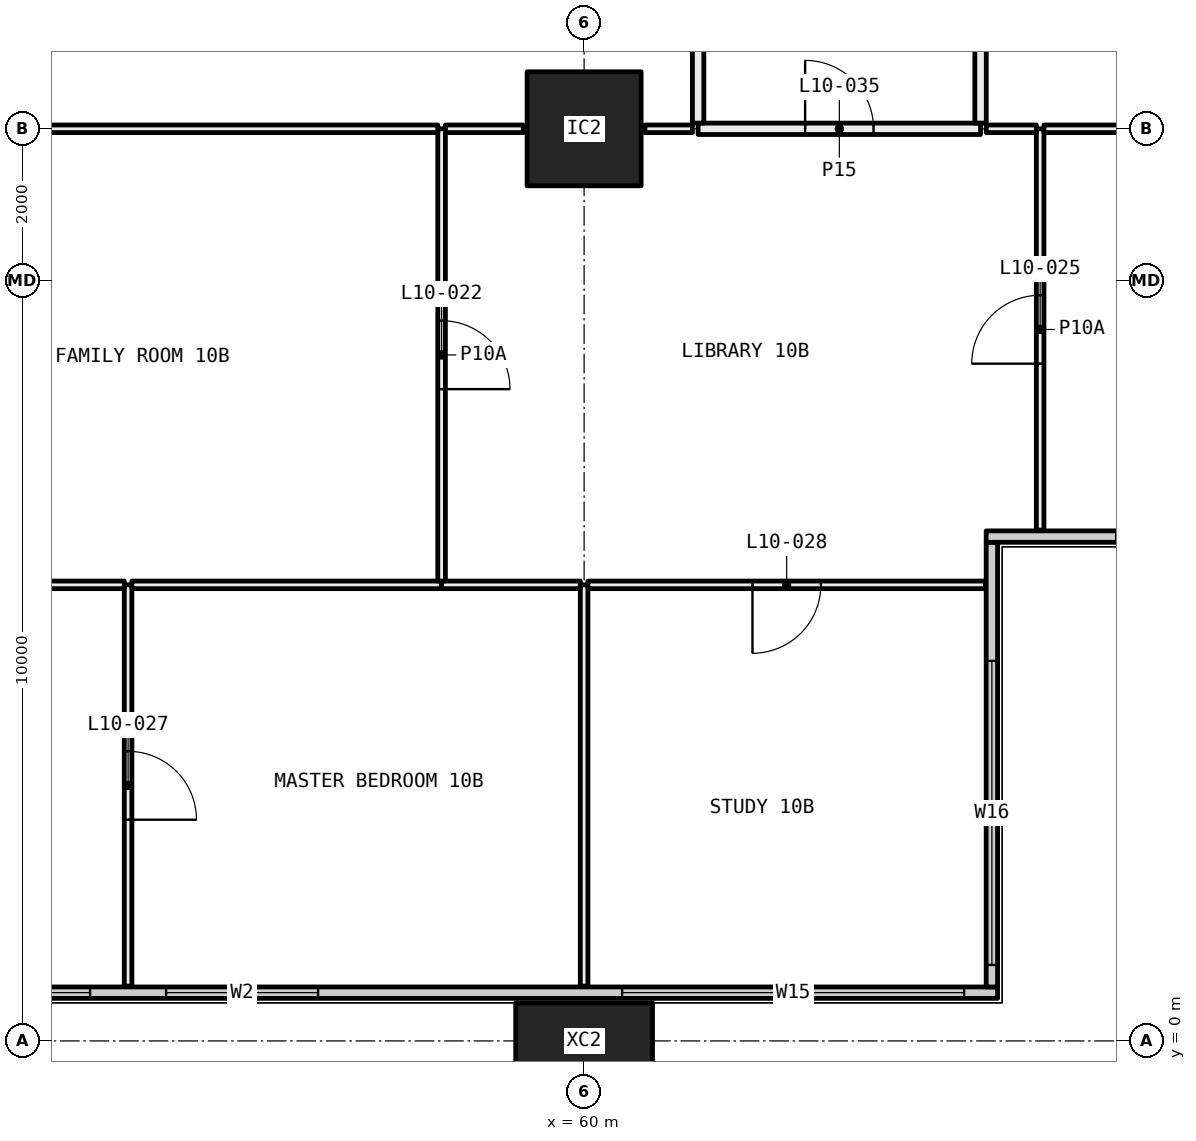
"""IFC4 building model, lengths in metres.
Left out: names, types, materials, properties, quantities, classifications, styles, units other than length and angle.
Written with IfcOpenShell. Run it as: python <this file> out.ifc"""

import sys

from ifc_helpers import new_model, si_unit, direction, frame, frame_2d, origin, origin_2d, place, context, subcontext, project, spatial, rectangle, hollow_rectangle, extrude, element, fill, save


model = new_model("IFC4")
c1 = context("Model", 3, precision=1e-05, world=origin(), true_north=direction((0.0, 1.0)))
c2 = subcontext(c1, "Body", "Model", "MODEL_VIEW")
j1 = project(units=[si_unit("LENGTHUNIT", "METRE"), si_unit("PLANEANGLEUNIT", "RADIAN")], contexts=[c1])
p1 = place(None, origin())
s1 = spatial("IfcSite", under=j1, at=p1, CompositionType="ELEMENT")
p2 = place(p1, origin())
s2 = spatial("IfcBuilding", under=s1, at=p2, CompositionType="ELEMENT")
p3 = place(p2, frame((0.0, 0.0, 47.25)))
s3 = spatial("IfcBuildingStorey", under=s2, at=p3, CompositionType="ELEMENT", Elevation=47.25)
p4 = place(p3, frame((60.0, 0.0, -0.4), z_axis=(0.0, 0.0, 1.0), x_axis=(1.0, 0.0, 0.0)))
e1 = element("IfcColumn", 1, at=p4, inside=s3, PredefinedType="COLUMN", context=c2, shape_type="SweptSolid", body=[
    extrude(hollow_rectangle(XDim=1.8, YDim=1.0, WallThickness=0.07, at=origin_2d()), origin(), (0.0, 0.0, 1.0), 3.45),
])
p5 = place(p3, frame((60.0, 12.0, 0.0), z_axis=(0.0, 0.0, 1.0), x_axis=(1.0, 0.0, 0.0)))
e2 = element("IfcColumn", 2, at=p5, inside=s3, PredefinedType="COLUMN", context=c2, shape_type="SweptSolid", body=[
    extrude(hollow_rectangle(XDim=1.5, YDim=1.5, WallThickness=0.065, at=origin_2d()), origin(), (0.0, 0.0, 1.0), 3.05),
])
p6 = place(p3, frame((6.56, 0.635, 0.0), z_axis=(0.0, 0.0, 1.0), x_axis=(1.0, 0.0, 0.0)))
e3 = element("IfcWall", 3, at=p6, inside=s3, PredefinedType="ELEMENTEDWALL", context=c2, shape_type="SweptSolid", body=[
    extrude(rectangle(XDim=58.88, YDim=0.15, at=frame_2d((29.44, 0.0))), origin(), (0.0, 0.0, 1.0), 3.05),
])
p7 = place(p6, frame((0.44, 0.0, 0.45)))
e4 = element("IfcOpeningElement", 4, at=p7, cuts=e3, PredefinedType="OPENING", context=c2, shape_type="SweptSolid", body=[
    extrude(rectangle(XDim=4.5, YDim=2.55, at=frame_2d((2.25, 1.275))), frame((0.0, 0.085, 0.0), z_axis=(0.0, -1.0, 0.0), x_axis=(1.0, 0.0, 0.0)), (0.0, 0.0, 1.0), 0.17),
])
p8 = place(p6, frame((7.94, 0.0, 0.45)))
e5 = element("IfcOpeningElement", 5, at=p8, cuts=e3, PredefinedType="OPENING", context=c2, shape_type="SweptSolid", body=[
    extrude(rectangle(XDim=3.0, YDim=2.55, at=frame_2d((1.5, 1.275))), frame((0.0, 0.085, 0.0), z_axis=(0.0, -1.0, 0.0), x_axis=(1.0, 0.0, 0.0)), (0.0, 0.0, 1.0), 0.17),
])
p9 = place(p6, frame((11.94, 0.0, 0.45)))
e6 = element("IfcOpeningElement", 6, at=p9, cuts=e3, PredefinedType="OPENING", context=c2, shape_type="SweptSolid", body=[
    extrude(rectangle(XDim=3.0, YDim=2.55, at=frame_2d((1.5, 1.275))), frame((0.0, 0.085, 0.0), z_axis=(0.0, -1.0, 0.0), x_axis=(1.0, 0.0, 0.0)), (0.0, 0.0, 1.0), 0.17),
])
p10 = place(p6, frame((19.94, 0.0, 0.45)))
e7 = element("IfcOpeningElement", 7, at=p10, cuts=e3, PredefinedType="OPENING", context=c2, shape_type="SweptSolid", body=[
    extrude(rectangle(XDim=3.0, YDim=2.55, at=frame_2d((1.5, 1.275))), frame((0.0, 0.085, 0.0), z_axis=(0.0, -1.0, 0.0), x_axis=(1.0, 0.0, 0.0)), (0.0, 0.0, 1.0), 0.17),
])
p11 = place(p6, frame((23.94, 0.0, 0.45)))
e8 = element("IfcOpeningElement", 8, at=p11, cuts=e3, PredefinedType="OPENING", context=c2, shape_type="SweptSolid", body=[
    extrude(rectangle(XDim=2.0, YDim=2.55, at=frame_2d((1.0, 1.275))), frame((0.0, 0.085, 0.0), z_axis=(0.0, -1.0, 0.0), x_axis=(1.0, 0.0, 0.0)), (0.0, 0.0, 1.0), 0.17),
])
p12 = place(p6, frame((31.94, 0.0, 0.45)))
e9 = element("IfcOpeningElement", 9, at=p12, cuts=e3, PredefinedType="OPENING", context=c2, shape_type="SweptSolid", body=[
    extrude(rectangle(XDim=3.0, YDim=2.55, at=frame_2d((1.5, 1.275))), frame((0.0, 0.085, 0.0), z_axis=(0.0, -1.0, 0.0), x_axis=(1.0, 0.0, 0.0)), (0.0, 0.0, 1.0), 0.17),
])
p13 = place(p6, frame((35.94, 0.0, 0.45)))
e10 = element("IfcOpeningElement", 10, at=p13, cuts=e3, PredefinedType="OPENING", context=c2, shape_type="SweptSolid", body=[
    extrude(rectangle(XDim=3.0, YDim=2.55, at=frame_2d((1.5, 1.275))), frame((0.0, 0.085, 0.0), z_axis=(0.0, -1.0, 0.0), x_axis=(1.0, 0.0, 0.0)), (0.0, 0.0, 1.0), 0.17),
])
p14 = place(p6, frame((43.94, 0.0, 0.45)))
e11 = element("IfcOpeningElement", 11, at=p14, cuts=e3, PredefinedType="OPENING", context=c2, shape_type="SweptSolid", body=[
    extrude(rectangle(XDim=3.0, YDim=2.55, at=frame_2d((1.5, 1.275))), frame((0.0, 0.085, 0.0), z_axis=(0.0, -1.0, 0.0), x_axis=(1.0, 0.0, 0.0)), (0.0, 0.0, 1.0), 0.17),
])
p15 = place(p6, frame((47.94, 0.0, 0.45)))
e12 = element("IfcOpeningElement", 12, at=p15, cuts=e3, PredefinedType="OPENING", context=c2, shape_type="SweptSolid", body=[
    extrude(rectangle(XDim=2.0, YDim=2.55, at=frame_2d((1.0, 1.275))), frame((0.0, 0.085, 0.0), z_axis=(0.0, -1.0, 0.0), x_axis=(1.0, 0.0, 0.0)), (0.0, 0.0, 1.0), 0.17),
])
p16 = place(p6, frame((53.94, 0.0, 0.45)))
e13 = element("IfcOpeningElement", 13, at=p16, cuts=e3, PredefinedType="OPENING", context=c2, shape_type="SweptSolid", body=[
    extrude(rectangle(XDim=4.5, YDim=2.55, at=frame_2d((2.25, 1.275))), frame((0.0, 0.085, 0.0), z_axis=(0.0, -1.0, 0.0), x_axis=(1.0, 0.0, 0.0)), (0.0, 0.0, 1.0), 0.17),
])
p17 = place(p3, frame((65.365, 0.71, 0.0), z_axis=(0.0, 0.0, 1.0), x_axis=(0.0, 1.0, 0.0)))
e14 = element("IfcWall", 14, at=p17, inside=s3, PredefinedType="ELEMENTEDWALL", context=c2, shape_type="SweptSolid", body=[
    extrude(rectangle(XDim=5.85, YDim=0.15, at=frame_2d((2.925, 0.0))), origin(), (0.0, 0.0, 1.0), 3.05),
])
p18 = place(p17, frame((0.29, 0.0, 0.45)))
e15 = element("IfcOpeningElement", 15, at=p18, cuts=e14, PredefinedType="OPENING", context=c2, shape_type="SweptSolid", body=[
    extrude(rectangle(XDim=4.0, YDim=2.55, at=frame_2d((2.0, 1.275))), frame((0.0, 0.085, 0.0), z_axis=(0.0, -1.0, 0.0), x_axis=(1.0, 0.0, 0.0)), (0.0, 0.0, 1.0), 0.17),
])
p19 = place(p3, frame((65.29, 6.635, 0.0), z_axis=(0.0, 0.0, 1.0), x_axis=(1.0, 0.0, 0.0)))
e16 = element("IfcWall", 16, at=p19, inside=s3, PredefinedType="ELEMENTEDWALL", context=c2, shape_type="SweptSolid", body=[
    extrude(rectangle(XDim=6.15, YDim=0.15, at=frame_2d((3.075, 0.0))), origin(), (0.0, 0.0, 1.0), 3.05),
])
p20 = place(p19, frame((1.71, 0.0, 0.45)))
e17 = element("IfcOpeningElement", 17, at=p20, cuts=e16, PredefinedType="OPENING", context=c2, shape_type="SweptSolid", body=[
    extrude(rectangle(XDim=4.0, YDim=2.55, at=frame_2d((2.0, 1.275))), frame((0.0, 0.085, 0.0), z_axis=(0.0, -1.0, 0.0), x_axis=(1.0, 0.0, 0.0)), (0.0, 0.0, 1.0), 0.17),
])
p21 = place(p3, frame((54.0, 0.72, 0.0), z_axis=(0.0, 0.0, 1.0), x_axis=(0.0, 1.0, 0.0)))
e18 = element("IfcWall", 18, at=p21, inside=s3, PredefinedType="PARTITIONING", context=c2, shape_type="SweptSolid", body=[
    extrude(rectangle(XDim=5.28, YDim=0.1, at=frame_2d((2.64, 0.0))), origin(), (0.0, 0.0, 1.0), 3.05),
])
p22 = place(p21, frame((2.19, 0.0, 0.0)))
e19 = element("IfcOpeningElement", 19, at=p22, cuts=e18, PredefinedType="OPENING", context=c2, shape_type="SweptSolid", body=[
    extrude(rectangle(XDim=0.9, YDim=2.1, at=frame_2d((0.45, 1.05))), frame((0.0, 0.06, 0.0), z_axis=(0.0, -1.0, 0.0), x_axis=(1.0, 0.0, 0.0)), (0.0, 0.0, 1.0), 0.12),
])
p23 = place(p3, frame((53.95, 6.0, 0.0), z_axis=(0.0, 0.0, 1.0), x_axis=(-1.0, 0.0, 0.0)))
e20 = element("IfcWall", 20, at=p23, inside=s3, PredefinedType="PARTITIONING", context=c2, shape_type="SweptSolid", body=[
    extrude(rectangle(XDim=3.7, YDim=0.1, at=frame_2d((1.85, 0.0))), origin(), (0.0, 0.0, 1.0), 3.05),
])
p24 = place(p3, frame((60.0, 0.72, 0.0), z_axis=(0.0, 0.0, 1.0), x_axis=(0.0, 1.0, 0.0)))
e21 = element("IfcWall", 21, at=p24, inside=s3, PredefinedType="PARTITIONING", context=c2, shape_type="SweptSolid", body=[
    extrude(rectangle(XDim=5.28, YDim=0.1, at=frame_2d((2.64, 0.0))), origin(), (0.0, 0.0, 1.0), 2.45),
])
p25 = place(p3, frame((58.125, 6.0, 0.0), z_axis=(0.0, 0.0, 1.0), x_axis=(-1.0, 0.0, 0.0)))
e22 = element("IfcWall", 22, at=p25, inside=s3, PredefinedType="PARTITIONING", context=c2, shape_type="SweptSolid", body=[
    extrude(rectangle(XDim=4.075, YDim=0.1, at=frame_2d((2.038, 0.0))), origin(), (0.0, 0.0, 1.0), 3.05),
])
p26 = place(p3, frame((59.95, 6.0, 0.0), z_axis=(0.0, 0.0, 1.0), x_axis=(-1.0, 0.0, 0.0)))
e23 = element("IfcWall", 23, at=p26, inside=s3, PredefinedType="PARTITIONING", context=c2, shape_type="SweptSolid", body=[
    extrude(rectangle(XDim=1.825, YDim=0.1, at=frame_2d((0.913, 0.0))), origin(), (0.0, 0.0, 1.0), 2.45),
])
p27 = place(p3, frame((65.28, 6.0, 0.0), z_axis=(0.0, 0.0, 1.0), x_axis=(-1.0, 0.0, 0.0)))
e24 = element("IfcWall", 24, at=p27, inside=s3, PredefinedType="PARTITIONING", context=c2, shape_type="SweptSolid", body=[
    extrude(rectangle(XDim=5.23, YDim=0.1, at=frame_2d((2.615, 0.0))), origin(), (0.0, 0.0, 1.0), 2.45),
])
p28 = place(p27, frame((2.165, 0.0, 0.0)))
e25 = element("IfcOpeningElement", 25, at=p28, cuts=e24, PredefinedType="OPENING", context=c2, shape_type="SweptSolid", body=[
    extrude(rectangle(XDim=0.9, YDim=2.1, at=frame_2d((0.45, 1.05))), frame((0.0, 0.06, 0.0), z_axis=(0.0, -1.0, 0.0), x_axis=(1.0, 0.0, 0.0)), (0.0, 0.0, 1.0), 0.12),
])
p29 = place(p3, frame((58.125, 6.05, 0.0), z_axis=(0.0, 0.0, 1.0), x_axis=(0.0, 1.0, 0.0)))
e26 = element("IfcWall", 26, at=p29, inside=s3, PredefinedType="PARTITIONING", context=c2, shape_type="SweptSolid", body=[
    extrude(rectangle(XDim=5.95, YDim=0.1, at=frame_2d((2.975, 0.0))), origin(), (0.0, 0.0, 1.0), 2.45),
])
p30 = place(p29, frame((2.525, 0.0, 0.0)))
e27 = element("IfcOpeningElement", 27, at=p30, cuts=e26, PredefinedType="OPENING", context=c2, shape_type="SweptSolid", body=[
    extrude(rectangle(XDim=0.9, YDim=2.1, at=frame_2d((0.45, 1.05))), frame((0.0, 0.06, 0.0), z_axis=(0.0, -1.0, 0.0), x_axis=(1.0, 0.0, 0.0)), (0.0, 0.0, 1.0), 0.12),
])
p31 = place(p3, frame((58.075, 12.0, 0.0), z_axis=(0.0, 0.0, 1.0), x_axis=(-1.0, 0.0, 0.0)))
e28 = element("IfcWall", 28, at=p31, inside=s3, PredefinedType="PARTITIONING", context=c2, shape_type="SweptSolid", body=[
    extrude(rectangle(XDim=5.575, YDim=0.1, at=frame_2d((2.788, 0.0))), origin(), (0.0, 0.0, 1.0), 2.45),
])
p32 = place(p3, frame((66.0, 6.72, 0.0), z_axis=(0.0, 0.0, 1.0), x_axis=(0.0, 1.0, 0.0)))
e29 = element("IfcWall", 29, at=p32, inside=s3, PredefinedType="PARTITIONING", context=c2, shape_type="SweptSolid", body=[
    extrude(rectangle(XDim=5.28, YDim=0.1, at=frame_2d((2.64, 0.0))), origin(), (0.0, 0.0, 1.0), 2.45),
])
p33 = place(p32, frame((2.19, 0.0, 0.0)))
e30 = element("IfcOpeningElement", 30, at=p33, cuts=e29, PredefinedType="OPENING", context=c2, shape_type="SweptSolid", body=[
    extrude(rectangle(XDim=0.9, YDim=2.1, at=frame_2d((0.45, 1.05))), frame((0.0, 0.06, 0.0), z_axis=(0.0, -1.0, 0.0), x_axis=(1.0, 0.0, 0.0)), (0.0, 0.0, 1.0), 0.12),
])
p34 = place(p3, frame((59.2, 12.0, 0.0), z_axis=(0.0, 0.0, 1.0), x_axis=(-1.0, 0.0, 0.0)))
e31 = element("IfcWall", 31, at=p34, inside=s3, PredefinedType="PARTITIONING", context=c2, shape_type="SweptSolid", body=[
    extrude(rectangle(XDim=1.025, YDim=0.1, at=frame_2d((0.512, 0.0))), origin(), (0.0, 0.0, 1.0), 2.45),
])
p35 = place(p3, frame((61.425, 12.0, 0.0), z_axis=(0.0, 0.0, 1.0), x_axis=(-1.0, 0.0, 0.0)))
e32 = element("IfcWall", 32, at=p35, inside=s3, PredefinedType="PARTITIONING", context=c2, shape_type="SweptSolid", body=[
    extrude(rectangle(XDim=0.625, YDim=0.1, at=frame_2d((0.312, 0.0))), origin(), (0.0, 0.0, 1.0), 2.45),
])
p36 = place(p3, frame((65.95, 12.0, 0.0), z_axis=(0.0, 0.0, 1.0), x_axis=(-1.0, 0.0, 0.0)))
e33 = element("IfcWall", 33, at=p36, inside=s3, PredefinedType="PARTITIONING", context=c2, shape_type="SweptSolid", body=[
    extrude(rectangle(XDim=0.659, YDim=0.1, at=frame_2d((0.33, 0.0))), origin(), (0.0, 0.0, 1.0), 2.45),
])
p37 = place(p3, frame((65.216, 12.0, 0.0), z_axis=(0.0, 0.0, 1.0), x_axis=(-1.0, 0.0, 0.0)))
e34 = element("IfcWall", 34, at=p37, inside=s3, PredefinedType="PARTITIONING", context=c2, shape_type="SweptSolid", body=[
    extrude(rectangle(XDim=3.716, YDim=0.15, at=frame_2d((1.858, 0.0))), origin(), (0.0, 0.0, 1.0), 2.45),
])
p38 = place(p37, frame((1.408, 0.0, 0.0)))
e35 = element("IfcOpeningElement", 35, at=p38, cuts=e34, PredefinedType="OPENING", context=c2, shape_type="SweptSolid", body=[
    extrude(rectangle(XDim=0.9, YDim=2.1, at=frame_2d((0.45, 1.05))), frame((0.0, 0.085, 0.0), z_axis=(0.0, -1.0, 0.0), x_axis=(1.0, 0.0, 0.0)), (0.0, 0.0, 1.0), 0.17),
])
p39 = place(p3, frame((71.28, 12.0, 0.0), z_axis=(0.0, 0.0, 1.0), x_axis=(-1.0, 0.0, 0.0)))
e36 = element("IfcWall", 36, at=p39, inside=s3, PredefinedType="PARTITIONING", context=c2, shape_type="SweptSolid", body=[
    extrude(rectangle(XDim=5.23, YDim=0.1, at=frame_2d((2.615, 0.0))), origin(), (0.0, 0.0, 1.0), 2.45),
])
p40 = place(p39, frame((2.165, 0.0, 0.0)))
e37 = element("IfcOpeningElement", 37, at=p40, cuts=e36, PredefinedType="OPENING", context=c2, shape_type="SweptSolid", body=[
    extrude(rectangle(XDim=0.9, YDim=2.1, at=frame_2d((0.45, 1.05))), frame((0.0, 0.06, 0.0), z_axis=(0.0, -1.0, 0.0), x_axis=(1.0, 0.0, 0.0)), (0.0, 0.0, 1.0), 0.12),
])
for number, where, z_axis, x_axis in (
    (38, (61.5, 12.075, 0.0), (0.0, 0.0, 1.0), (0.0, 1.0, 0.0)),
    (39, (65.216, 15.229, 0.0), (0.0, 0.0, 1.0), (0.0, -1.0, 0.0)),
):
    element("IfcWall", number, at=place(p3, frame(where, z_axis=z_axis, x_axis=x_axis)), inside=s3, PredefinedType="PARTITIONING", context=c2, shape_type="SweptSolid", body=[
        extrude(rectangle(XDim=3.154, YDim=0.15, at=frame_2d((1.577, 0.0))), origin(), (0.0, 0.0, 1.0), 2.45),
    ])
p41 = place(p14, origin())
e40 = element("IfcWindow", 40, at=p41, inside=s3, PartitioningType="SINGLE_PANEL", PredefinedType="WINDOW", context=c2, shape_type="SweptSolid", body=[
    extrude(rectangle(XDim=3.0, YDim=2.55, at=frame_2d((1.5, 1.275))), frame((0.0, 0.03, 0.0), z_axis=(0.0, -1.0, 0.0), x_axis=(1.0, 0.0, 0.0)), (0.0, 0.0, 1.0), 0.06),
])
fill(e11, e40)
p42 = place(p15, origin())
e41 = element("IfcWindow", 41, at=p42, inside=s3, PartitioningType="SINGLE_PANEL", PredefinedType="WINDOW", context=c2, shape_type="SweptSolid", body=[
    extrude(rectangle(XDim=2.0, YDim=2.55, at=frame_2d((1.0, 1.275))), frame((0.0, 0.03, 0.0), z_axis=(0.0, -1.0, 0.0), x_axis=(1.0, 0.0, 0.0)), (0.0, 0.0, 1.0), 0.06),
])
fill(e12, e41)
p43 = place(p16, origin())
e42 = element("IfcWindow", 42, at=p43, inside=s3, PartitioningType="SINGLE_PANEL", PredefinedType="WINDOW", context=c2, shape_type="SweptSolid", body=[
    extrude(rectangle(XDim=4.5, YDim=2.55, at=frame_2d((2.25, 1.275))), frame((0.0, 0.03, 0.0), z_axis=(0.0, -1.0, 0.0), x_axis=(1.0, 0.0, 0.0)), (0.0, 0.0, 1.0), 0.06),
])
fill(e13, e42)
p44 = place(p18, origin())
e43 = element("IfcWindow", 43, at=p44, inside=s3, PartitioningType="SINGLE_PANEL", PredefinedType="WINDOW", context=c2, shape_type="SweptSolid", body=[
    extrude(rectangle(XDim=4.0, YDim=2.55, at=frame_2d((2.0, 1.275))), frame((0.0, 0.03, 0.0), z_axis=(0.0, -1.0, 0.0), x_axis=(1.0, 0.0, 0.0)), (0.0, 0.0, 1.0), 0.06),
])
fill(e15, e43)
p45 = place(p30, frame((0.9, 0.0, 0.0), x_axis=(-1.0, 0.0, 0.0)))
e44 = element("IfcDoor", 44, at=p45, inside=s3, OperationType="SINGLE_SWING_LEFT", PredefinedType="DOOR", context=c2, shape_type="SweptSolid", body=[
    extrude(rectangle(XDim=0.9, YDim=2.1, at=frame_2d((0.45, 1.05))), frame((0.0, 0.025, 0.0), z_axis=(0.0, -1.0, 0.0), x_axis=(1.0, 0.0, 0.0)), (0.0, 0.0, 1.0), 0.05),
])
fill(e27, e44)
p46 = place(p33, origin())
e45 = element("IfcDoor", 45, at=p46, inside=s3, OperationType="SINGLE_SWING_RIGHT", PredefinedType="DOOR", context=c2, shape_type="SweptSolid", body=[
    extrude(rectangle(XDim=0.9, YDim=2.1, at=frame_2d((0.45, 1.05))), frame((0.0, 0.025, 0.0), z_axis=(0.0, -1.0, 0.0), x_axis=(1.0, 0.0, 0.0)), (0.0, 0.0, 1.0), 0.05),
])
fill(e30, e45)
p47 = place(p22, frame((0.9, 0.0, 0.0), x_axis=(-1.0, 0.0, 0.0)))
e46 = element("IfcDoor", 46, at=p47, inside=s3, OperationType="SINGLE_SWING_LEFT", PredefinedType="DOOR", context=c2, shape_type="SweptSolid", body=[
    extrude(rectangle(XDim=0.9, YDim=2.1, at=frame_2d((0.45, 1.05))), frame((0.0, 0.025, 0.0), z_axis=(0.0, -1.0, 0.0), x_axis=(1.0, 0.0, 0.0)), (0.0, 0.0, 1.0), 0.05),
])
fill(e19, e46)
p48 = place(p28, origin())
e47 = element("IfcDoor", 47, at=p48, inside=s3, OperationType="SINGLE_SWING_LEFT", PredefinedType="DOOR", context=c2, shape_type="SweptSolid", body=[
    extrude(rectangle(XDim=0.9, YDim=2.1, at=frame_2d((0.45, 1.05))), frame((0.0, 0.025, 0.0), z_axis=(0.0, -1.0, 0.0), x_axis=(1.0, 0.0, 0.0)), (0.0, 0.0, 1.0), 0.05),
])
fill(e25, e47)
p49 = place(p38, frame((0.9, 0.0, 0.0), x_axis=(-1.0, 0.0, 0.0)))
e48 = element("IfcDoor", 48, at=p49, inside=s3, OperationType="SINGLE_SWING_RIGHT", PredefinedType="DOOR", context=c2, shape_type="SweptSolid", body=[
    extrude(rectangle(XDim=0.9, YDim=2.1, at=frame_2d((0.45, 1.05))), frame((0.0, 0.025, 0.0), z_axis=(0.0, -1.0, 0.0), x_axis=(1.0, 0.0, 0.0)), (0.0, 0.0, 1.0), 0.05),
])
fill(e35, e48)
save(model, sys.argv[1])
